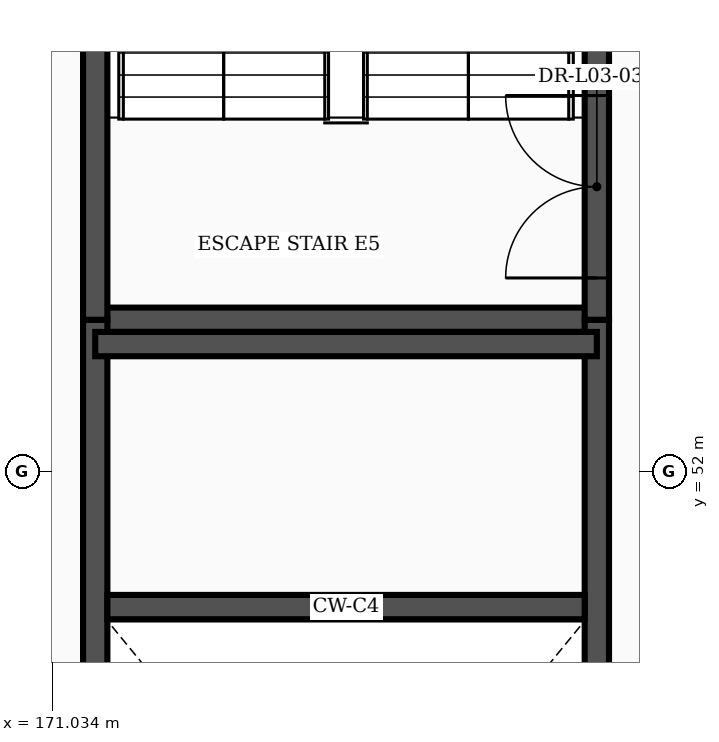
"""IFC4 building model, lengths in metres.
Left out: names, types, materials, properties, quantities, classifications, styles, units other than length and angle.
Written with IfcOpenShell. Run it as: python <this file> out.ifc"""

import sys

from ifc_helpers import new_model, si_unit, direction, frame, frame_2d, origin, place, context, subcontext, project, spatial, rectangle, extrude, element, fill, save


model = new_model("IFC4")
c1 = context("Model", 3, precision=1e-05, world=origin(), true_north=direction((0.0, 1.0)))
c2 = subcontext(c1, "Body", "Model", "MODEL_VIEW")
j1 = project(units=[si_unit("LENGTHUNIT", "METRE"), si_unit("PLANEANGLEUNIT", "RADIAN")], contexts=[c1])
p1 = place(None, origin())
s1 = spatial("IfcSite", under=j1, at=p1, CompositionType="ELEMENT")
p2 = place(p1, origin())
s2 = spatial("IfcBuilding", under=s1, at=p2, CompositionType="ELEMENT")
p3 = place(p2, frame((0.0, 0.0, 16.8)))
s3 = spatial("IfcBuildingStorey", under=s2, at=p3, CompositionType="ELEMENT", Elevation=16.8)
p4 = place(p3, frame((171.6, 54.0, 0.0), z_axis=(0.0, 0.0, 1.0), x_axis=(1.0, 0.0, 0.0)))
e1 = element("IfcWall", 1, at=p4, inside=s3, PredefinedType="SHEAR", context=c2, shape_type="SweptSolid", body=[
    extrude(rectangle(XDim=6.6, YDim=0.32, at=frame_2d((3.3, 0.0))), origin(), (0.0, 0.0, 1.0), 4.555),
])
p5 = place(p3, frame((171.6, 39.4, 0.0), z_axis=(0.0, 0.0, 1.0), x_axis=(0.0, 1.0, 0.0)))
e2 = element("IfcWall", 2, at=p5, inside=s3, PredefinedType="SHEAR", context=c2, shape_type="SweptSolid", body=[
    extrude(rectangle(XDim=14.6, YDim=0.32, at=frame_2d((7.3, 0.0))), origin(), (0.0, 0.0, 1.0), 4.555),
])
p6 = place(p3, frame((178.2, 39.4, 0.0), z_axis=(0.0, 0.0, 1.0), x_axis=(0.0, 1.0, 0.0)))
e3 = element("IfcWall", 3, at=p6, inside=s3, PredefinedType="SHEAR", context=c2, shape_type="SweptSolid", body=[
    extrude(rectangle(XDim=14.6, YDim=0.32, at=frame_2d((7.3, 0.0))), origin(), (0.0, 0.0, 1.0), 4.555),
])
p7 = place(p6, frame((0.55, 0.0, 0.0)))
e4 = element("IfcOpeningElement", 4, at=p7, cuts=e3, PredefinedType="OPENING", context=c2, shape_type="SweptSolid", body=[
    extrude(rectangle(XDim=2.4, YDim=2.25, at=frame_2d((1.2, 1.125))), frame((0.0, 0.172, 0.0), z_axis=(0.0, -1.0, 0.0), x_axis=(1.0, 0.0, 0.0)), (0.0, 0.0, 1.0), 0.344),
])
p8 = place(p3, frame((171.76, 50.22, 0.0), z_axis=(0.0, 0.0, 1.0), x_axis=(1.0, 0.0, 0.0)))
e5 = element("IfcWall", 5, at=p8, inside=s3, PredefinedType="SHEAR", context=c2, shape_type="SweptSolid", body=[
    extrude(rectangle(XDim=6.28, YDim=0.32, at=frame_2d((3.14, 0.0))), origin(), (0.0, 0.0, 1.0), 4.555),
])
p9 = place(p3, frame((171.6, 53.68, 0.0), z_axis=(0.0, 0.0, 1.0), x_axis=(1.0, 0.0, 0.0)))
e6 = element("IfcWall", 6, at=p9, inside=s3, PredefinedType="SHEAR", context=c2, shape_type="SweptSolid", body=[
    extrude(rectangle(XDim=6.6, YDim=0.32, at=frame_2d((3.3, 0.0))), origin(), (0.0, 0.0, 1.0), 4.555),
])
p10 = place(p3, frame((171.6, 54.0, 0.0), z_axis=(0.0, 0.0, 1.0), x_axis=(0.0, 1.0, 0.0)))
e7 = element("IfcWall", 7, at=p10, inside=s3, PredefinedType="SHEAR", context=c2, shape_type="SweptSolid", body=[
    extrude(rectangle(XDim=12.0, YDim=0.32, at=frame_2d((6.0, 0.0))), origin(), (0.0, 0.0, 1.0), 4.555),
])
p11 = place(p3, frame((178.2, 54.0, 0.0), z_axis=(0.0, 0.0, 1.0), x_axis=(0.0, 1.0, 0.0)))
e8 = element("IfcWall", 8, at=p11, inside=s3, PredefinedType="SHEAR", context=c2, shape_type="SweptSolid", body=[
    extrude(rectangle(XDim=12.0, YDim=0.32, at=frame_2d((6.0, 0.0))), origin(), (0.0, 0.0, 1.0), 4.555),
])
p12 = place(p11, frame((0.55, 0.0, 0.0)))
e9 = element("IfcOpeningElement", 9, at=p12, cuts=e8, PredefinedType="OPENING", context=c2, shape_type="SweptSolid", body=[
    extrude(rectangle(XDim=2.4, YDim=2.25, at=frame_2d((1.2, 1.125))), frame((0.0, 0.172, 0.0), z_axis=(0.0, -1.0, 0.0), x_axis=(1.0, 0.0, 0.0)), (0.0, 0.0, 1.0), 0.344),
])
p13 = place(p12, origin())
e10 = element("IfcDoor", 10, at=p13, inside=s3, OperationType="DOUBLE_DOOR_SINGLE_SWING", PredefinedType="DOOR", context=c2, shape_type="SweptSolid", body=[
    extrude(rectangle(XDim=2.4, YDim=2.25, at=frame_2d((1.2, 1.125))), frame((0.0, 0.025, 0.0), z_axis=(0.0, -1.0, 0.0), x_axis=(1.0, 0.0, 0.0)), (0.0, 0.0, 1.0), 0.05),
])
fill(e9, e10)
save(model, sys.argv[1])
